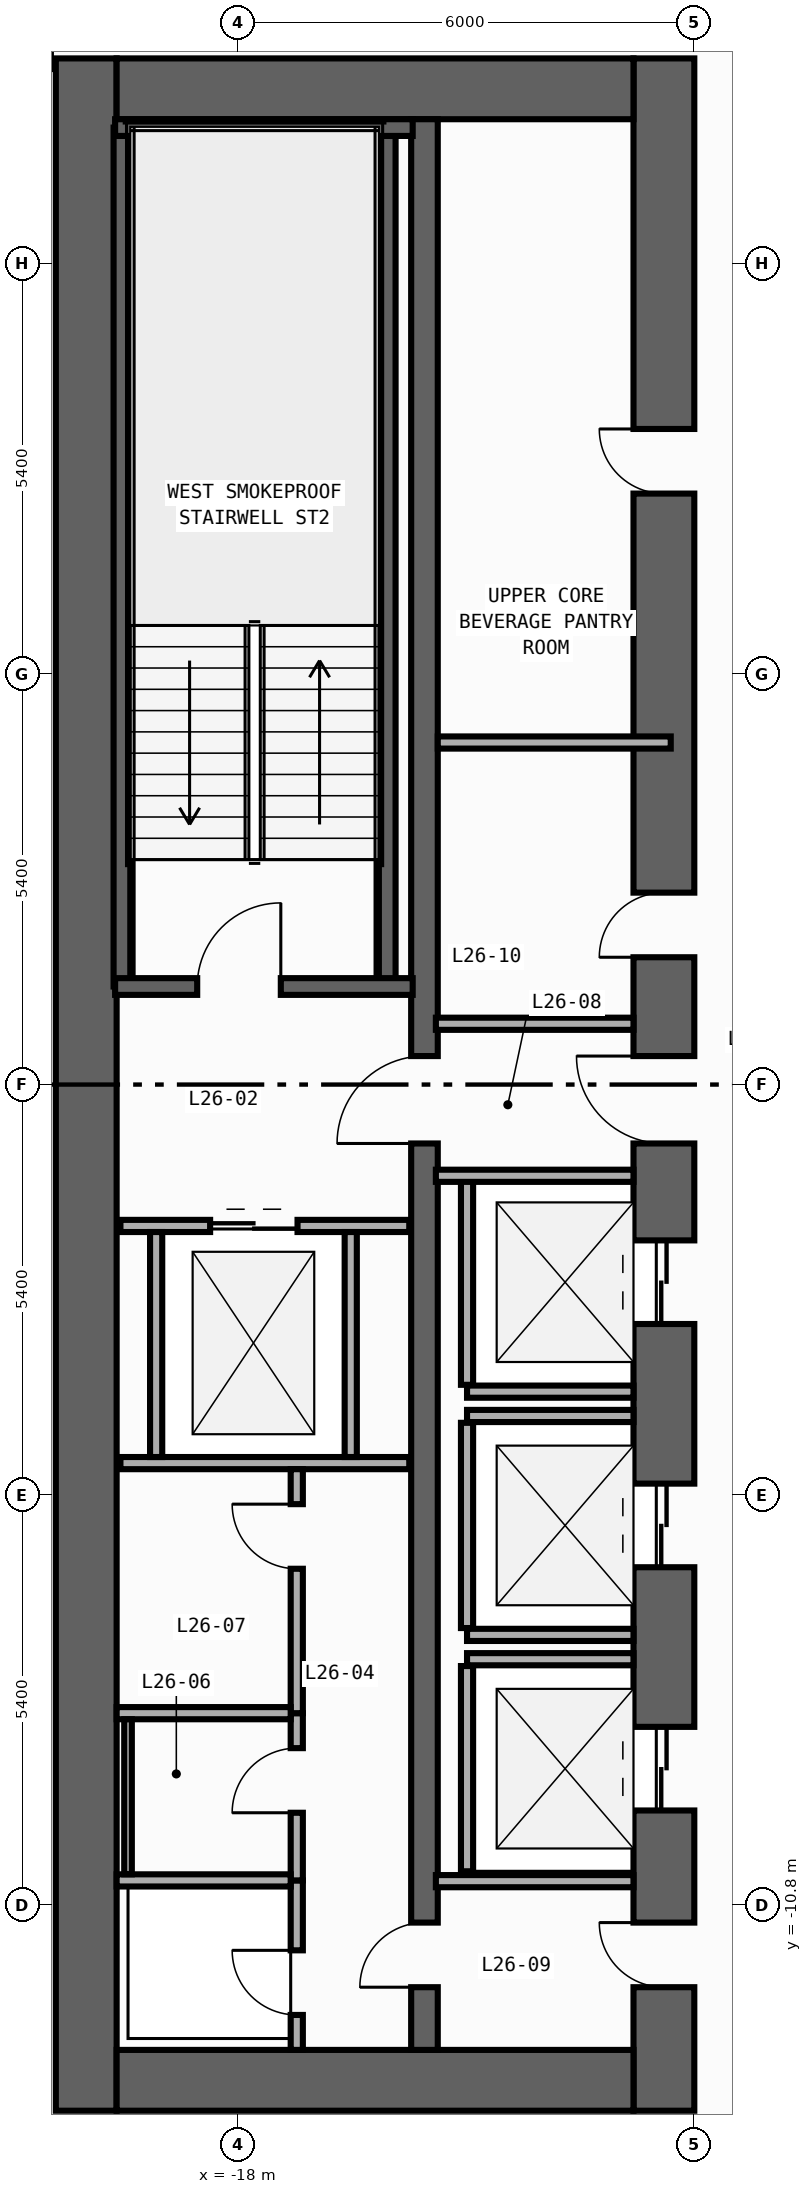
"""IFC4 building model, lengths in metres.
Left out: names, types, materials, properties, quantities, classifications, styles, units other than length and angle.
Written with IfcOpenShell. Run it as: python <this file> out.ifc"""

import sys

from ifc_helpers import new_model, si_unit, direction, frame, frame_2d, origin, place, context, subcontext, project, spatial, rectangle, extrude, element, fill, save


model = new_model("IFC4")
c1 = context("Model", 3, precision=1e-05, world=origin(), true_north=direction((0.0, 1.0)))
c2 = subcontext(c1, "Body", "Model", "MODEL_VIEW")
j1 = project(units=[si_unit("LENGTHUNIT", "METRE"), si_unit("PLANEANGLEUNIT", "RADIAN")], contexts=[c1])
p1 = place(None, origin())
s1 = spatial("IfcSite", under=j1, at=p1, CompositionType="ELEMENT")
p2 = place(p1, origin())
s2 = spatial("IfcBuilding", under=s1, at=p2, CompositionType="ELEMENT")
p3 = place(p2, frame((0.0, 0.0, 114.2)))
s3 = spatial("IfcBuildingStorey", under=s2, at=p3, CompositionType="ELEMENT", Elevation=114.2)
p4 = place(p3, frame((-20.0, -13.5, 0.0), z_axis=(0.0, 0.0, 1.0), x_axis=(0.0, 1.0, 0.0)))
e1 = element("IfcWall", 1, at=p4, inside=s3, PredefinedType="SHEAR", context=c2, shape_type="SweptSolid", body=[
    extrude(rectangle(XDim=27.0, YDim=0.8, at=frame_2d((13.5, 0.0))), origin(), (0.0, 0.0, 1.0), 3.94),
])
p5 = place(p3, frame((-12.4, -13.5, 0.0), z_axis=(0.0, 0.0, 1.0), x_axis=(0.0, 1.0, 0.0)))
e2 = element("IfcWall", 2, at=p5, inside=s3, PredefinedType="SHEAR", context=c2, shape_type="SweptSolid", body=[
    extrude(rectangle(XDim=27.0, YDim=0.8, at=frame_2d((13.5, 0.0))), origin(), (0.0, 0.0, 1.0), 3.94),
])
p6 = place(p5, frame((10.35, 0.0, 0.0)))
e3 = element("IfcOpeningElement", 3, at=p6, cuts=e2, PredefinedType="OPENING", context=c2, shape_type="SweptSolid", body=[
    extrude(rectangle(XDim=1.1, YDim=2.2, at=frame_2d((0.55, 1.1))), frame((0.0, 0.41, 0.0), z_axis=(0.0, -1.0, 0.0), x_axis=(1.0, 0.0, 0.0)), (0.0, 0.0, 1.0), 0.82),
])
p7 = place(p5, frame((7.15, 0.0, 0.0)))
e4 = element("IfcOpeningElement", 4, at=p7, cuts=e2, PredefinedType="OPENING", context=c2, shape_type="SweptSolid", body=[
    extrude(rectangle(XDim=1.1, YDim=2.2, at=frame_2d((0.55, 1.1))), frame((0.0, 0.41, 0.0), z_axis=(0.0, -1.0, 0.0), x_axis=(1.0, 0.0, 0.0)), (0.0, 0.0, 1.0), 0.82),
])
p8 = place(p5, frame((3.95, 0.0, 0.0)))
e5 = element("IfcOpeningElement", 5, at=p8, cuts=e2, PredefinedType="OPENING", context=c2, shape_type="SweptSolid", body=[
    extrude(rectangle(XDim=1.1, YDim=2.2, at=frame_2d((0.55, 1.1))), frame((0.0, 0.41, 0.0), z_axis=(0.0, -1.0, 0.0), x_axis=(1.0, 0.0, 0.0)), (0.0, 0.0, 1.0), 0.82),
])
p9 = place(p5, frame((15.175, 0.0, 0.0)))
e6 = element("IfcOpeningElement", 6, at=p9, cuts=e2, PredefinedType="OPENING", context=c2, shape_type="SweptSolid", body=[
    extrude(rectangle(XDim=0.85, YDim=2.1, at=frame_2d((0.425, 1.05))), frame((0.0, 0.41, 0.0), z_axis=(0.0, -1.0, 0.0), x_axis=(1.0, 0.0, 0.0)), (0.0, 0.0, 1.0), 0.82),
])
p10 = place(p5, frame((21.275, 0.0, 0.0)))
e7 = element("IfcOpeningElement", 7, at=p10, cuts=e2, PredefinedType="OPENING", context=c2, shape_type="SweptSolid", body=[
    extrude(rectangle(XDim=0.85, YDim=2.1, at=frame_2d((0.425, 1.05))), frame((0.0, 0.41, 0.0), z_axis=(0.0, -1.0, 0.0), x_axis=(1.0, 0.0, 0.0)), (0.0, 0.0, 1.0), 0.82),
])
p11 = place(p5, frame((12.725, 0.0, 0.0)))
e8 = element("IfcOpeningElement", 8, at=p11, cuts=e2, PredefinedType="OPENING", context=c2, shape_type="SweptSolid", body=[
    extrude(rectangle(XDim=1.15, YDim=2.2, at=frame_2d((0.575, 1.1))), frame((0.0, 0.41, 0.0), z_axis=(0.0, -1.0, 0.0), x_axis=(1.0, 0.0, 0.0)), (0.0, 0.0, 1.0), 0.82),
])
p12 = place(p5, frame((1.625, 0.0, 0.0)))
e9 = element("IfcOpeningElement", 9, at=p12, cuts=e2, PredefinedType="OPENING", context=c2, shape_type="SweptSolid", body=[
    extrude(rectangle(XDim=0.85, YDim=2.1, at=frame_2d((0.425, 1.05))), frame((0.0, 0.41, 0.0), z_axis=(0.0, -1.0, 0.0), x_axis=(1.0, 0.0, 0.0)), (0.0, 0.0, 1.0), 0.82),
])
for number, where, z_axis, x_axis in (
    (10, (-19.6, -13.1, 0.0), (0.0, 0.0, 1.0), (1.0, 0.0, 0.0)),
    (11, (-19.6, 13.1, 0.0), (0.0, 0.0, 1.0), (1.0, 0.0, 0.0)),
):
    element("IfcWall", number, at=place(p3, frame(where, z_axis=z_axis, x_axis=x_axis)), inside=s3, PredefinedType="SHEAR", context=c2, shape_type="SweptSolid", body=[
        extrude(rectangle(XDim=6.8, YDim=0.8, at=frame_2d((3.4, 0.0))), origin(), (0.0, 0.0, 1.0), 3.94),
    ])
p13 = place(p3, frame((-15.55, -12.7, 0.0), z_axis=(0.0, 0.0, 1.0), x_axis=(0.0, 1.0, 0.0)))
e12 = element("IfcWall", 12, at=p13, inside=s3, PredefinedType="SHEAR", context=c2, shape_type="SweptSolid", body=[
    extrude(rectangle(XDim=25.4, YDim=0.35, at=frame_2d((12.7, 0.0))), origin(), (0.0, 0.0, 1.0), 3.94),
])
p14 = place(p13, frame((11.925, 0.0, 0.0)))
e13 = element("IfcOpeningElement", 13, at=p14, cuts=e12, PredefinedType="OPENING", context=c2, shape_type="SweptSolid", body=[
    extrude(rectangle(XDim=1.15, YDim=2.2, at=frame_2d((0.575, 1.1))), frame((0.0, 0.185, 0.0), z_axis=(0.0, -1.0, 0.0), x_axis=(1.0, 0.0, 0.0)), (0.0, 0.0, 1.0), 0.37),
])
p15 = place(p13, frame((0.825, 0.0, 0.0)))
e14 = element("IfcOpeningElement", 14, at=p15, cuts=e12, PredefinedType="OPENING", context=c2, shape_type="SweptSolid", body=[
    extrude(rectangle(XDim=0.85, YDim=2.1, at=frame_2d((0.425, 1.05))), frame((0.0, 0.185, 0.0), z_axis=(0.0, -1.0, 0.0), x_axis=(1.0, 0.0, 0.0)), (0.0, 0.0, 1.0), 0.37),
])
for number, where, z_axis, x_axis in (
    (15, (-16.04, 1.29, 0.0), (0.0, 0.0, 1.0), (0.0, 1.0, 0.0)),
    (16, (-19.53, 1.29, 0.0), (0.0, 0.0, 1.0), (0.0, 1.0, 0.0)),
):
    element("IfcWall", number, at=place(p3, frame(where, z_axis=z_axis, x_axis=x_axis)), inside=s3, PredefinedType="SHEAR", context=c2, shape_type="SweptSolid", body=[
        extrude(rectangle(XDim=11.3, YDim=0.22, at=frame_2d((5.65, 0.0))), origin(), (0.0, 0.0, 1.0), 3.94),
    ])
p16 = place(p3, frame((-19.62, 12.59, 0.0), z_axis=(0.0, 0.0, 1.0), x_axis=(1.0, 0.0, 0.0)))
e17 = element("IfcWall", 17, at=p16, inside=s3, PredefinedType="SHEAR", context=c2, shape_type="SweptSolid", body=[
    extrude(rectangle(XDim=3.915, YDim=0.22, at=frame_2d((1.958, 0.0))), origin(), (0.0, 0.0, 1.0), 3.94),
])
p17 = place(p3, frame((-19.62, 1.29, 0.0), z_axis=(0.0, 0.0, 1.0), x_axis=(1.0, 0.0, 0.0)))
e18 = element("IfcWall", 18, at=p17, inside=s3, PredefinedType="SHEAR", context=c2, shape_type="SweptSolid", body=[
    extrude(rectangle(XDim=3.915, YDim=0.22, at=frame_2d((1.958, 0.0))), origin(), (0.0, 0.0, 1.0), 3.94),
])
p18 = place(p17, frame((1.08, 0.0, 0.0)))
e19 = element("IfcOpeningElement", 19, at=p18, cuts=e18, PredefinedType="OPENING", context=c2, shape_type="SweptSolid", body=[
    extrude(rectangle(XDim=1.1, YDim=2.2, at=frame_2d((0.55, 1.1))), frame((0.0, 0.12, 0.0), z_axis=(0.0, -1.0, 0.0), x_axis=(1.0, 0.0, 0.0)), (0.0, 0.0, 1.0), 0.24),
])
p19 = place(p3, frame((-14.99, -4.04, 0.0), z_axis=(0.0, 0.0, 1.0), x_axis=(1.0, 0.0, 0.0)))
e20 = element("IfcWall", 20, at=p19, inside=s3, PredefinedType="STANDARD", context=c2, shape_type="SweptSolid", body=[
    extrude(rectangle(XDim=2.19, YDim=0.16, at=frame_2d((1.095, 0.0))), origin(), (0.0, 0.0, 1.0), 3.94),
])
p20 = place(p3, frame((-14.99, -3.95, 0.0), z_axis=(0.0, 0.0, 1.0), x_axis=(0.0, 1.0, 0.0)))
e21 = element("IfcWall", 21, at=p20, inside=s3, PredefinedType="STANDARD", context=c2, shape_type="SweptSolid", body=[
    extrude(rectangle(XDim=2.7, YDim=0.16, at=frame_2d((1.35, 0.0))), origin(), (0.0, 0.0, 1.0), 3.94),
])
for number, where, z_axis, x_axis in (
    (22, (-14.99, -7.24, 0.0), (0.0, 0.0, 1.0), (1.0, 0.0, 0.0)),
    (23, (-14.99, -4.36, 0.0), (0.0, 0.0, 1.0), (1.0, 0.0, 0.0)),
):
    element("IfcWall", number, at=place(p3, frame(where, z_axis=z_axis, x_axis=x_axis)), inside=s3, PredefinedType="STANDARD", context=c2, shape_type="SweptSolid", body=[
        extrude(rectangle(XDim=2.19, YDim=0.16, at=frame_2d((1.095, 0.0))), origin(), (0.0, 0.0, 1.0), 3.94),
    ])
p21 = place(p3, frame((-14.99, -7.15, 0.0), z_axis=(0.0, 0.0, 1.0), x_axis=(0.0, 1.0, 0.0)))
e24 = element("IfcWall", 24, at=p21, inside=s3, PredefinedType="STANDARD", context=c2, shape_type="SweptSolid", body=[
    extrude(rectangle(XDim=2.7, YDim=0.16, at=frame_2d((1.35, 0.0))), origin(), (0.0, 0.0, 1.0), 3.94),
])
p22 = place(p3, frame((-14.99, -7.56, 0.0), z_axis=(0.0, 0.0, 1.0), x_axis=(1.0, 0.0, 0.0)))
e25 = element("IfcWall", 25, at=p22, inside=s3, PredefinedType="STANDARD", context=c2, shape_type="SweptSolid", body=[
    extrude(rectangle(XDim=2.19, YDim=0.16, at=frame_2d((1.095, 0.0))), origin(), (0.0, 0.0, 1.0), 3.94),
])
p23 = place(p3, frame((-14.99, -10.35, 0.0), z_axis=(0.0, 0.0, 1.0), x_axis=(0.0, 1.0, 0.0)))
e26 = element("IfcWall", 26, at=p23, inside=s3, PredefinedType="STANDARD", context=c2, shape_type="SweptSolid", body=[
    extrude(rectangle(XDim=2.7, YDim=0.16, at=frame_2d((1.35, 0.0))), origin(), (0.0, 0.0, 1.0), 3.94),
])
p24 = place(p3, frame((-19.55, -1.86, 0.0), z_axis=(0.0, 0.0, 1.0), x_axis=(1.0, 0.0, 0.0)))
e27 = element("IfcWall", 27, at=p24, inside=s3, PredefinedType="STANDARD", context=c2, shape_type="SweptSolid", body=[
    extrude(rectangle(XDim=3.8, YDim=0.16, at=frame_2d((1.9, 0.0))), origin(), (0.0, 0.0, 1.0), 3.94),
])
p25 = place(p24, frame((1.18, 0.0, 0.0)))
e28 = element("IfcOpeningElement", 28, at=p25, cuts=e27, PredefinedType="OPENING", context=c2, shape_type="SweptSolid", body=[
    extrude(rectangle(XDim=1.15, YDim=2.2, at=frame_2d((0.575, 1.1))), frame((0.0, 0.09, 0.0), z_axis=(0.0, -1.0, 0.0), x_axis=(1.0, 0.0, 0.0)), (0.0, 0.0, 1.0), 0.18),
])
p26 = place(p3, frame((-19.55, -4.98, 0.0), z_axis=(0.0, 0.0, 1.0), x_axis=(1.0, 0.0, 0.0)))
e29 = element("IfcWall", 29, at=p26, inside=s3, PredefinedType="STANDARD", context=c2, shape_type="SweptSolid", body=[
    extrude(rectangle(XDim=3.8, YDim=0.16, at=frame_2d((1.9, 0.0))), origin(), (0.0, 0.0, 1.0), 3.94),
])
for number, where, z_axis, x_axis in (
    (30, (-19.08, -4.9, 0.0), (0.0, 0.0, 1.0), (0.0, 1.0, 0.0)),
    (31, (-16.52, -4.9, 0.0), (0.0, 0.0, 1.0), (0.0, 1.0, 0.0)),
):
    element("IfcWall", number, at=place(p3, frame(where, z_axis=z_axis, x_axis=x_axis)), inside=s3, PredefinedType="STANDARD", context=c2, shape_type="SweptSolid", body=[
        extrude(rectangle(XDim=2.96, YDim=0.16, at=frame_2d((1.48, 0.0))), origin(), (0.0, 0.0, 1.0), 3.94),
    ])
for number, where, z_axis, x_axis in (
    (32, (-15.4, 0.8, 0.0), (0.0, 0.0, 1.0), (1.0, 0.0, 0.0)),
    (33, (-15.4, -1.2, 0.0), (0.0, 0.0, 1.0), (1.0, 0.0, 0.0)),
    (34, (-15.4, -10.48, 0.0), (0.0, 0.0, 1.0), (1.0, 0.0, 0.0)),
):
    element("IfcWall", number, at=place(p3, frame(where, z_axis=z_axis, x_axis=x_axis)), inside=s3, PredefinedType="STANDARD", context=c2, shape_type="SweptSolid", body=[
        extrude(rectangle(XDim=2.6, YDim=0.16, at=frame_2d((1.3, 0.0))), origin(), (0.0, 0.0, 1.0), 3.94),
    ])
p27 = place(p3, frame((-17.23, -12.7, 0.0), z_axis=(0.0, 0.0, 1.0), x_axis=(0.0, 1.0, 0.0)))
e35 = element("IfcWall", 35, at=p27, inside=s3, PredefinedType="PARTITIONING", context=c2, shape_type="SweptSolid", body=[
    extrude(rectangle(XDim=2.23, YDim=0.16, at=frame_2d((1.115, 0.0))), origin(), (0.0, 0.0, 1.0), 3.94),
])
p28 = place(p27, frame((0.46, 0.0, 0.0)))
e36 = element("IfcOpeningElement", 36, at=p28, cuts=e35, PredefinedType="OPENING", context=c2, shape_type="SweptSolid", body=[
    extrude(rectangle(XDim=0.85, YDim=2.1, at=frame_2d((0.425, 1.05))), frame((0.0, 0.09, 0.0), z_axis=(0.0, -1.0, 0.0), x_axis=(1.0, 0.0, 0.0)), (0.0, 0.0, 1.0), 0.18),
])
p29 = place(p3, frame((-17.23, -10.47, 0.0), z_axis=(0.0, 0.0, 1.0), x_axis=(0.0, 1.0, 0.0)))
e37 = element("IfcWall", 37, at=p29, inside=s3, PredefinedType="PARTITIONING", context=c2, shape_type="SweptSolid", body=[
    extrude(rectangle(XDim=2.2, YDim=0.16, at=frame_2d((1.1, 0.0))), origin(), (0.0, 0.0, 1.0), 3.94),
])
p30 = place(p29, frame((0.89, 0.0, 0.0)))
e38 = element("IfcOpeningElement", 38, at=p30, cuts=e37, PredefinedType="OPENING", context=c2, shape_type="SweptSolid", body=[
    extrude(rectangle(XDim=0.85, YDim=2.1, at=frame_2d((0.425, 1.05))), frame((0.0, 0.09, 0.0), z_axis=(0.0, -1.0, 0.0), x_axis=(1.0, 0.0, 0.0)), (0.0, 0.0, 1.0), 0.18),
])
p31 = place(p3, frame((-17.23, -8.27, 0.0), z_axis=(0.0, 0.0, 1.0), x_axis=(0.0, 1.0, 0.0)))
e39 = element("IfcWall", 39, at=p31, inside=s3, PredefinedType="PARTITIONING", context=c2, shape_type="SweptSolid", body=[
    extrude(rectangle(XDim=3.21, YDim=0.16, at=frame_2d((1.605, 0.0))), origin(), (0.0, 0.0, 1.0), 3.94),
])
p32 = place(p31, frame((1.9, 0.0, 0.0)))
e40 = element("IfcOpeningElement", 40, at=p32, cuts=e39, PredefinedType="OPENING", context=c2, shape_type="SweptSolid", body=[
    extrude(rectangle(XDim=0.85, YDim=2.1, at=frame_2d((0.425, 1.05))), frame((0.0, 0.09, 0.0), z_axis=(0.0, -1.0, 0.0), x_axis=(1.0, 0.0, 0.0)), (0.0, 0.0, 1.0), 0.18),
])
for number, where, z_axis, x_axis in (
    (41, (-19.6, -10.47, 0.0), (0.0, 0.0, 1.0), (1.0, 0.0, 0.0)),
    (42, (-19.6, -8.27, 0.0), (0.0, 0.0, 1.0), (1.0, 0.0, 0.0)),
):
    element("IfcWall", number, at=place(p3, frame(where, z_axis=z_axis, x_axis=x_axis)), inside=s3, PredefinedType="PARTITIONING", context=c2, shape_type="SweptSolid", body=[
        extrude(rectangle(XDim=2.29, YDim=0.16, at=frame_2d((1.145, 0.0))), origin(), (0.0, 0.0, 1.0), 3.94),
    ])
p33 = place(p3, frame((-15.375, 4.5, 0.0), z_axis=(0.0, 0.0, 1.0), x_axis=(1.0, 0.0, 0.0)))
e43 = element("IfcWall", 43, at=p33, inside=s3, PredefinedType="PARTITIONING", context=c2, shape_type="SweptSolid", body=[
    extrude(rectangle(XDim=3.065, YDim=0.16, at=frame_2d((1.532, 0.0))), origin(), (0.0, 0.0, 1.0), 3.94),
])
p34 = place(p3, frame((-19.45, -10.39, 0.0), z_axis=(0.0, 0.0, 1.0), x_axis=(0.0, 1.0, 0.0)))
e44 = element("IfcWall", 44, at=p34, inside=s3, PredefinedType="PARTITIONING", context=c2, shape_type="SweptSolid", body=[
    extrude(rectangle(XDim=2.04, YDim=0.1, at=frame_2d((1.02, 0.0))), origin(), (0.0, 0.0, 1.0), 3.94),
])
p35 = place(p18, origin())
e45 = element("IfcDoor", 45, at=p35, inside=s3, OperationType="SINGLE_SWING_RIGHT", PredefinedType="DOOR", context=c2, shape_type="SweptSolid", body=[
    extrude(rectangle(XDim=1.1, YDim=2.2, at=frame_2d((0.55, 1.1))), frame((0.0, 0.025, 0.0), z_axis=(0.0, -1.0, 0.0), x_axis=(1.0, 0.0, 0.0)), (0.0, 0.0, 1.0), 0.05),
])
fill(e19, e45)
p36 = place(p6, origin())
e46 = element("IfcDoor", 46, at=p36, inside=s3, OperationType="DOUBLE_DOOR_SLIDING", PredefinedType="DOOR", context=c2, shape_type="SweptSolid", body=[
    extrude(rectangle(XDim=1.1, YDim=2.2, at=frame_2d((0.55, 1.1))), frame((0.0, 0.025, 0.0), z_axis=(0.0, -1.0, 0.0), x_axis=(1.0, 0.0, 0.0)), (0.0, 0.0, 1.0), 0.05),
])
fill(e3, e46)
p37 = place(p7, origin())
e47 = element("IfcDoor", 47, at=p37, inside=s3, OperationType="DOUBLE_DOOR_SLIDING", PredefinedType="DOOR", context=c2, shape_type="SweptSolid", body=[
    extrude(rectangle(XDim=1.1, YDim=2.2, at=frame_2d((0.55, 1.1))), frame((0.0, 0.025, 0.0), z_axis=(0.0, -1.0, 0.0), x_axis=(1.0, 0.0, 0.0)), (0.0, 0.0, 1.0), 0.05),
])
fill(e4, e47)
p38 = place(p8, origin())
e48 = element("IfcDoor", 48, at=p38, inside=s3, OperationType="DOUBLE_DOOR_SLIDING", PredefinedType="DOOR", context=c2, shape_type="SweptSolid", body=[
    extrude(rectangle(XDim=1.1, YDim=2.2, at=frame_2d((0.55, 1.1))), frame((0.0, 0.025, 0.0), z_axis=(0.0, -1.0, 0.0), x_axis=(1.0, 0.0, 0.0)), (0.0, 0.0, 1.0), 0.05),
])
fill(e5, e48)
p39 = place(p9, origin())
e49 = element("IfcDoor", 49, at=p39, inside=s3, OperationType="SINGLE_SWING_LEFT", PredefinedType="DOOR", context=c2, shape_type="SweptSolid", body=[
    extrude(rectangle(XDim=0.85, YDim=2.1, at=frame_2d((0.425, 1.05))), frame((0.0, 0.025, 0.0), z_axis=(0.0, -1.0, 0.0), x_axis=(1.0, 0.0, 0.0)), (0.0, 0.0, 1.0), 0.05),
])
fill(e6, e49)
p40 = place(p10, origin())
e50 = element("IfcDoor", 50, at=p40, inside=s3, OperationType="SINGLE_SWING_RIGHT", PredefinedType="DOOR", context=c2, shape_type="SweptSolid", body=[
    extrude(rectangle(XDim=0.85, YDim=2.1, at=frame_2d((0.425, 1.05))), frame((0.0, 0.025, 0.0), z_axis=(0.0, -1.0, 0.0), x_axis=(1.0, 0.0, 0.0)), (0.0, 0.0, 1.0), 0.05),
])
fill(e7, e50)
p41 = place(p11, origin())
e51 = element("IfcDoor", 51, at=p41, inside=s3, OperationType="SINGLE_SWING_RIGHT", PredefinedType="DOOR", context=c2, shape_type="SweptSolid", body=[
    extrude(rectangle(XDim=1.15, YDim=2.2, at=frame_2d((0.575, 1.1))), frame((0.0, 0.025, 0.0), z_axis=(0.0, -1.0, 0.0), x_axis=(1.0, 0.0, 0.0)), (0.0, 0.0, 1.0), 0.05),
])
fill(e8, e51)
p42 = place(p14, origin())
e52 = element("IfcDoor", 52, at=p42, inside=s3, OperationType="SINGLE_SWING_LEFT", PredefinedType="DOOR", context=c2, shape_type="SweptSolid", body=[
    extrude(rectangle(XDim=1.15, YDim=2.2, at=frame_2d((0.575, 1.1))), frame((0.0, 0.025, 0.0), z_axis=(0.0, -1.0, 0.0), x_axis=(1.0, 0.0, 0.0)), (0.0, 0.0, 1.0), 0.05),
])
fill(e13, e52)
p43 = place(p12, origin())
e53 = element("IfcDoor", 53, at=p43, inside=s3, OperationType="SINGLE_SWING_RIGHT", PredefinedType="DOOR", context=c2, shape_type="SweptSolid", body=[
    extrude(rectangle(XDim=0.85, YDim=2.1, at=frame_2d((0.425, 1.05))), frame((0.0, 0.025, 0.0), z_axis=(0.0, -1.0, 0.0), x_axis=(1.0, 0.0, 0.0)), (0.0, 0.0, 1.0), 0.05),
])
fill(e9, e53)
p44 = place(p15, origin())
e54 = element("IfcDoor", 54, at=p44, inside=s3, OperationType="SINGLE_SWING_LEFT", PredefinedType="DOOR", context=c2, shape_type="SweptSolid", body=[
    extrude(rectangle(XDim=0.85, YDim=2.1, at=frame_2d((0.425, 1.05))), frame((0.0, 0.025, 0.0), z_axis=(0.0, -1.0, 0.0), x_axis=(1.0, 0.0, 0.0)), (0.0, 0.0, 1.0), 0.05),
])
fill(e14, e54)
p45 = place(p25, origin())
e55 = element("IfcDoor", 55, at=p45, inside=s3, OperationType="DOUBLE_DOOR_SLIDING", PredefinedType="DOOR", context=c2, shape_type="SweptSolid", body=[
    extrude(rectangle(XDim=1.15, YDim=2.2, at=frame_2d((0.575, 1.1))), frame((0.0, 0.025, 0.0), z_axis=(0.0, -1.0, 0.0), x_axis=(1.0, 0.0, 0.0)), (0.0, 0.0, 1.0), 0.05),
])
fill(e28, e55)
p46 = place(p28, origin())
e56 = element("IfcDoor", 56, at=p46, inside=s3, OperationType="SINGLE_SWING_RIGHT", PredefinedType="DOOR", context=c2, shape_type="SweptSolid", body=[
    extrude(rectangle(XDim=0.85, YDim=2.1, at=frame_2d((0.425, 1.05))), frame((0.0, 0.025, 0.0), z_axis=(0.0, -1.0, 0.0), x_axis=(1.0, 0.0, 0.0)), (0.0, 0.0, 1.0), 0.05),
])
fill(e36, e56)
p47 = place(p30, origin())
e57 = element("IfcDoor", 57, at=p47, inside=s3, OperationType="SINGLE_SWING_LEFT", PredefinedType="DOOR", context=c2, shape_type="SweptSolid", body=[
    extrude(rectangle(XDim=0.85, YDim=2.1, at=frame_2d((0.425, 1.05))), frame((0.0, 0.025, 0.0), z_axis=(0.0, -1.0, 0.0), x_axis=(1.0, 0.0, 0.0)), (0.0, 0.0, 1.0), 0.05),
])
fill(e38, e57)
p48 = place(p32, origin())
e58 = element("IfcDoor", 58, at=p48, inside=s3, OperationType="SINGLE_SWING_RIGHT", PredefinedType="DOOR", context=c2, shape_type="SweptSolid", body=[
    extrude(rectangle(XDim=0.85, YDim=2.1, at=frame_2d((0.425, 1.05))), frame((0.0, 0.025, 0.0), z_axis=(0.0, -1.0, 0.0), x_axis=(1.0, 0.0, 0.0)), (0.0, 0.0, 1.0), 0.05),
])
fill(e40, e58)
save(model, sys.argv[1])
